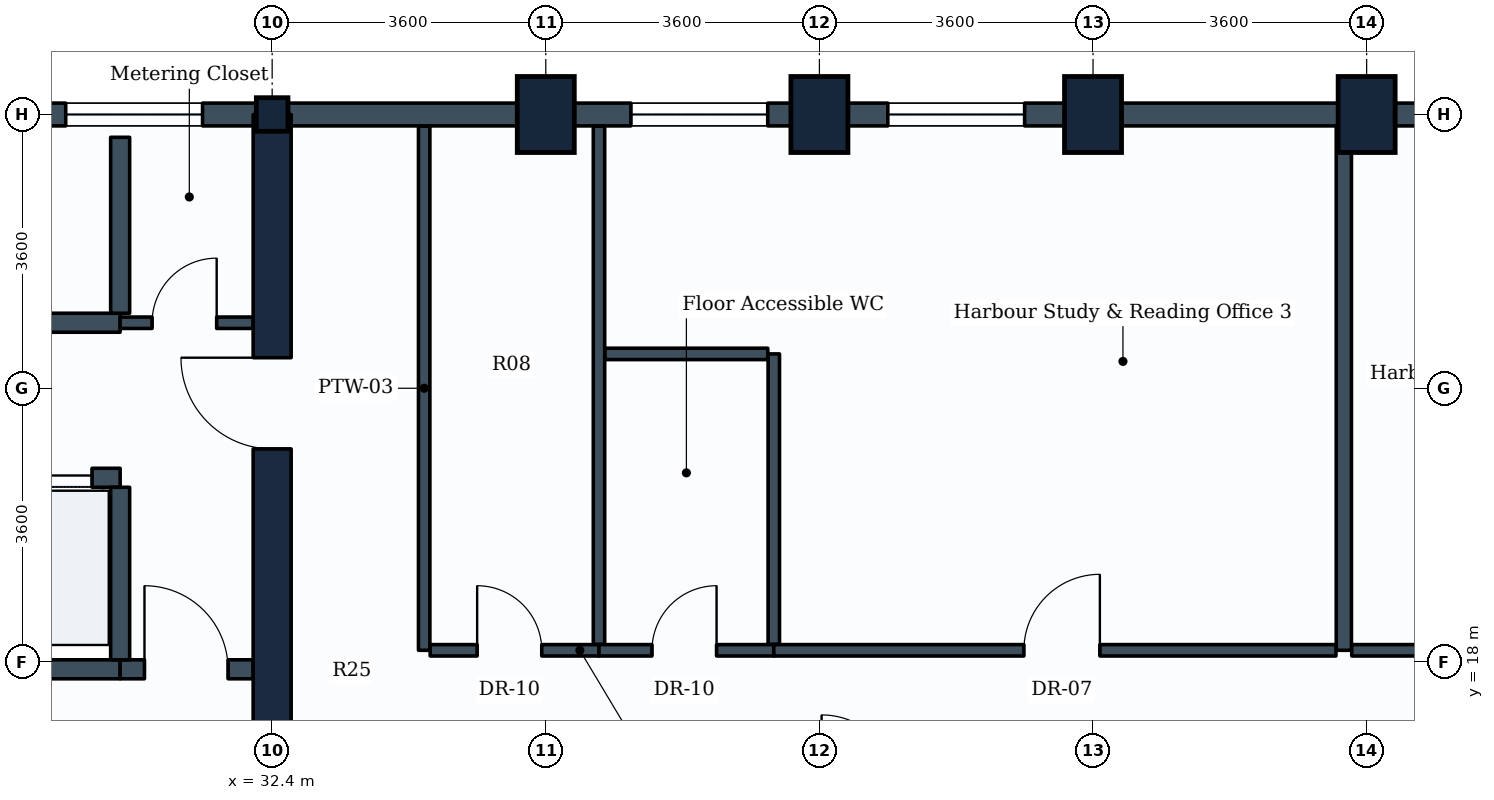
"""IFC4 building model, lengths in metres.
Left out: names, types, materials, properties, quantities, classifications, styles, units other than length and angle.
Written with IfcOpenShell. Run it as: python <this file> out.ifc"""

import sys

from ifc_helpers import new_model, si_unit, direction, frame, frame_2d, origin, origin_2d, place, context, subcontext, project, spatial, rectangle, i_section, extrude, element, fill, save


model = new_model("IFC4")
c1 = context("Model", 3, precision=1e-05, world=origin(), true_north=direction((0.0, 1.0)))
c2 = subcontext(c1, "Body", "Model", "MODEL_VIEW")
j1 = project(units=[si_unit("LENGTHUNIT", "METRE"), si_unit("PLANEANGLEUNIT", "RADIAN")], contexts=[c1])
p1 = place(None, origin())
s1 = spatial("IfcSite", under=j1, at=p1, CompositionType="ELEMENT")
p2 = place(p1, origin())
s2 = spatial("IfcBuilding", under=s1, at=p2, CompositionType="ELEMENT")
p3 = place(p2, frame((0.0, 0.0, 158.0)))
s3 = spatial("IfcBuildingStorey", under=s2, at=p3, CompositionType="ELEMENT", Elevation=158.0)
p4 = place(p3, frame((32.4, 25.2, 0.0), z_axis=(0.0, 0.0, 1.0), x_axis=(1.0, 0.0, 0.0)))
e1 = element("IfcColumn", 1, at=p4, inside=s3, PredefinedType="COLUMN", context=c2, shape_type="SweptSolid", body=[
    extrude(i_section(OverallWidth=0.416, OverallDepth=0.442, WebThickness=0.025, FlangeThickness=0.041, FilletRadius=0.015, at=origin_2d()), origin(), (0.0, 0.0, 1.0), 3.8),
])
for number, where, z_axis, x_axis in (
    (2, (36.0, 25.2, 0.0), (0.0, 0.0, 1.0), (1.0, 0.0, 0.0)),
    (3, (39.6, 25.2, 0.0), (0.0, 0.0, 1.0), (1.0, 0.0, 0.0)),
    (4, (43.2, 25.2, 0.0), (0.0, 0.0, 1.0), (1.0, 0.0, 0.0)),
    (5, (46.8, 25.2, 0.0), (0.0, 0.0, 1.0), (1.0, 0.0, 0.0)),
):
    element("IfcColumn", number, at=place(p3, frame(where, z_axis=z_axis, x_axis=x_axis)), inside=s3, PredefinedType="COLUMN", context=c2, shape_type="SweptSolid", body=[
        extrude(rectangle(XDim=0.75, YDim=1.0, at=origin_2d()), origin(), (0.0, 0.0, 1.0), 3.8),
    ])
p5 = place(p3, frame((46.8, 25.2, 0.0), z_axis=(0.0, 0.0, 1.0), x_axis=(1.0, 0.0, 0.0)))
e6 = element("IfcWall", 6, at=p5, inside=s3, PredefinedType="STANDARD", context=c2, shape_type="SweptSolid", body=[
    extrude(rectangle(XDim=3.6, YDim=0.3, at=frame_2d((1.8, 0.0))), origin(), (0.0, 0.0, 1.0), 2.93),
])
p6 = place(p5, frame((0.875, 0.0, 0.85)))
e7 = element("IfcOpeningElement", 7, at=p6, cuts=e6, PredefinedType="OPENING", context=c2, shape_type="SweptSolid", body=[
    extrude(rectangle(XDim=1.8, YDim=1.35, at=frame_2d((0.9, 0.675))), frame((0.0, 0.16, 0.0), z_axis=(0.0, -1.0, 0.0), x_axis=(1.0, 0.0, 0.0)), (0.0, 0.0, 1.0), 0.32),
])
p7 = place(p3, frame((43.2, 25.2, 0.0), z_axis=(0.0, 0.0, 1.0), x_axis=(1.0, 0.0, 0.0)))
e8 = element("IfcWall", 8, at=p7, inside=s3, PredefinedType="STANDARD", context=c2, shape_type="SweptSolid", body=[
    extrude(rectangle(XDim=3.6, YDim=0.3, at=frame_2d((1.8, 0.0))), origin(), (0.0, 0.0, 1.0), 2.93),
])
p8 = place(p3, frame((39.6, 25.2, 0.0), z_axis=(0.0, 0.0, 1.0), x_axis=(1.0, 0.0, 0.0)))
e9 = element("IfcWall", 9, at=p8, inside=s3, PredefinedType="STANDARD", context=c2, shape_type="SweptSolid", body=[
    extrude(rectangle(XDim=3.6, YDim=0.3, at=frame_2d((1.8, 0.0))), origin(), (0.0, 0.0, 1.0), 2.93),
])
p9 = place(p8, frame((0.9, 0.0, 0.85)))
e10 = element("IfcOpeningElement", 10, at=p9, cuts=e9, PredefinedType="OPENING", context=c2, shape_type="SweptSolid", body=[
    extrude(rectangle(XDim=1.8, YDim=1.35, at=frame_2d((0.9, 0.675))), frame((0.0, 0.16, 0.0), z_axis=(0.0, -1.0, 0.0), x_axis=(1.0, 0.0, 0.0)), (0.0, 0.0, 1.0), 0.32),
])
p10 = place(p3, frame((36.0, 25.2, 0.0), z_axis=(0.0, 0.0, 1.0), x_axis=(1.0, 0.0, 0.0)))
e11 = element("IfcWall", 11, at=p10, inside=s3, PredefinedType="STANDARD", context=c2, shape_type="SweptSolid", body=[
    extrude(rectangle(XDim=3.6, YDim=0.3, at=frame_2d((1.8, 0.0))), origin(), (0.0, 0.0, 1.0), 2.93),
])
p11 = place(p10, frame((1.12, 0.0, 0.85)))
e12 = element("IfcOpeningElement", 12, at=p11, cuts=e11, PredefinedType="OPENING", context=c2, shape_type="SweptSolid", body=[
    extrude(rectangle(XDim=1.8, YDim=1.35, at=frame_2d((0.9, 0.675))), frame((0.0, 0.16, 0.0), z_axis=(0.0, -1.0, 0.0), x_axis=(1.0, 0.0, 0.0)), (0.0, 0.0, 1.0), 0.32),
])
p12 = place(p3, frame((32.4, 25.2, 0.0), z_axis=(0.0, 0.0, 1.0), x_axis=(1.0, 0.0, 0.0)))
e13 = element("IfcWall", 13, at=p12, inside=s3, PredefinedType="STANDARD", context=c2, shape_type="SweptSolid", body=[
    extrude(rectangle(XDim=3.6, YDim=0.3, at=frame_2d((1.8, 0.0))), origin(), (0.0, 0.0, 1.0), 2.93),
])
p13 = place(p3, frame((28.8, 25.2, 0.0), z_axis=(0.0, 0.0, 1.0), x_axis=(1.0, 0.0, 0.0)))
e14 = element("IfcWall", 14, at=p13, inside=s3, PredefinedType="STANDARD", context=c2, shape_type="SweptSolid", body=[
    extrude(rectangle(XDim=3.6, YDim=0.3, at=frame_2d((1.8, 0.0))), origin(), (0.0, 0.0, 1.0), 3.535),
])
p14 = place(p13, frame((0.884, 0.0, 0.85)))
e15 = element("IfcOpeningElement", 15, at=p14, cuts=e14, PredefinedType="OPENING", context=c2, shape_type="SweptSolid", body=[
    extrude(rectangle(XDim=1.8, YDim=1.35, at=frame_2d((0.9, 0.675))), frame((0.0, 0.16, 0.0), z_axis=(0.0, -1.0, 0.0), x_axis=(1.0, 0.0, 0.0)), (0.0, 0.0, 1.0), 0.32),
])
p15 = place(p3, frame((32.4, 10.8, 0.0), z_axis=(0.0, 0.0, 1.0), x_axis=(0.0, 1.0, 0.0)))
e16 = element("IfcWall", 16, at=p15, inside=s3, PredefinedType="SHEAR", context=c2, shape_type="SweptSolid", body=[
    extrude(rectangle(XDim=14.4, YDim=0.5, at=frame_2d((7.2, 0.0))), origin(), (0.0, 0.0, 1.0), 3.55),
])
p16 = place(p15, frame((4.35, 0.0, 0.0)))
e17 = element("IfcOpeningElement", 17, at=p16, cuts=e16, PredefinedType="OPENING", context=c2, shape_type="SweptSolid", body=[
    extrude(rectangle(XDim=1.2, YDim=2.1, at=frame_2d((0.6, 1.05))), frame((0.0, 0.26, 0.0), z_axis=(0.0, -1.0, 0.0), x_axis=(1.0, 0.0, 0.0)), (0.0, 0.0, 1.0), 0.52),
])
p17 = place(p15, frame((10.0, 0.0, 0.0)))
e18 = element("IfcOpeningElement", 18, at=p17, cuts=e16, PredefinedType="OPENING", context=c2, shape_type="SweptSolid", body=[
    extrude(rectangle(XDim=1.2, YDim=2.1, at=frame_2d((0.6, 1.05))), frame((0.0, 0.26, 0.0), z_axis=(0.0, -1.0, 0.0), x_axis=(1.0, 0.0, 0.0)), (0.0, 0.0, 1.0), 0.52),
])
p18 = place(p3, frame((21.88, 17.9, 0.0), z_axis=(0.0, 0.0, 1.0), x_axis=(1.0, 0.0, 0.0)))
e19 = element("IfcWall", 19, at=p18, inside=s3, PredefinedType="PARTITIONING", context=c2, shape_type="SweptSolid", body=[
    extrude(rectangle(XDim=8.52, YDim=0.25, at=frame_2d((4.26, 0.0))), origin(), (0.0, 0.0, 1.0), 3.535),
])
p19 = place(p3, frame((30.4, 17.9, 0.0), z_axis=(0.0, 0.0, 1.0), x_axis=(1.0, 0.0, 0.0)))
e20 = element("IfcWall", 20, at=p19, inside=s3, PredefinedType="PARTITIONING", context=c2, shape_type="SweptSolid", body=[
    extrude(rectangle(XDim=1.75, YDim=0.25, at=frame_2d((0.875, 0.0))), origin(), (0.0, 0.0, 1.0), 3.535),
])
p20 = place(p19, frame((0.32, 0.0, 0.0)))
e21 = element("IfcOpeningElement", 21, at=p20, cuts=e20, PredefinedType="OPENING", context=c2, shape_type="SweptSolid", body=[
    extrude(rectangle(XDim=1.1, YDim=2.1, at=frame_2d((0.55, 1.05))), frame((0.0, 0.135, 0.0), z_axis=(0.0, -1.0, 0.0), x_axis=(1.0, 0.0, 0.0)), (0.0, 0.0, 1.0), 0.27),
])
p21 = place(p3, frame((23.18, 20.42, 0.0), z_axis=(0.0, 0.0, 1.0), x_axis=(1.0, 0.0, 0.0)))
e22 = element("IfcWall", 22, at=p21, inside=s3, PredefinedType="PARTITIONING", context=c2, shape_type="SweptSolid", body=[
    extrude(rectangle(XDim=7.22, YDim=0.25, at=frame_2d((3.61, 0.0))), origin(), (0.0, 0.0, 1.0), 3.535),
])
p22 = place(p21, frame((0.41, 0.0, 0.0)))
e23 = element("IfcOpeningElement", 23, at=p22, cuts=e22, PredefinedType="OPENING", context=c2, shape_type="SweptSolid", body=[
    extrude(rectangle(XDim=1.1, YDim=2.1, at=frame_2d((0.55, 1.05))), frame((0.0, 0.135, 0.0), z_axis=(0.0, -1.0, 0.0), x_axis=(1.0, 0.0, 0.0)), (0.0, 0.0, 1.0), 0.27),
])
p23 = place(p21, frame((2.19, 0.0, 0.0)))
e24 = element("IfcOpeningElement", 24, at=p23, cuts=e22, PredefinedType="OPENING", context=c2, shape_type="SweptSolid", body=[
    extrude(rectangle(XDim=1.1, YDim=2.1, at=frame_2d((0.55, 1.05))), frame((0.0, 0.135, 0.0), z_axis=(0.0, -1.0, 0.0), x_axis=(1.0, 0.0, 0.0)), (0.0, 0.0, 1.0), 0.27),
])
p24 = place(p21, frame((3.97, 0.0, 0.0)))
e25 = element("IfcOpeningElement", 25, at=p24, cuts=e22, PredefinedType="OPENING", context=c2, shape_type="SweptSolid", body=[
    extrude(rectangle(XDim=1.1, YDim=2.1, at=frame_2d((0.55, 1.05))), frame((0.0, 0.135, 0.0), z_axis=(0.0, -1.0, 0.0), x_axis=(1.0, 0.0, 0.0)), (0.0, 0.0, 1.0), 0.27),
])
p25 = place(p21, frame((5.75, 0.0, 0.0)))
e26 = element("IfcOpeningElement", 26, at=p25, cuts=e22, PredefinedType="OPENING", context=c2, shape_type="SweptSolid", body=[
    extrude(rectangle(XDim=1.1, YDim=2.1, at=frame_2d((0.55, 1.05))), frame((0.0, 0.135, 0.0), z_axis=(0.0, -1.0, 0.0), x_axis=(1.0, 0.0, 0.0)), (0.0, 0.0, 1.0), 0.27),
])
p26 = place(p3, frame((30.4, 18.025, 0.0), z_axis=(0.0, 0.0, 1.0), x_axis=(0.0, 1.0, 0.0)))
e27 = element("IfcWall", 27, at=p26, inside=s3, PredefinedType="PARTITIONING", context=c2, shape_type="SweptSolid", body=[
    extrude(rectangle(XDim=2.27, YDim=0.25, at=frame_2d((1.135, 0.0))), origin(), (0.0, 0.0, 1.0), 3.535),
])
p27 = place(p3, frame((23.18, 22.46, 0.0), z_axis=(0.0, 0.0, 1.0), x_axis=(1.0, 0.0, 0.0)))
e28 = element("IfcWall", 28, at=p27, inside=s3, PredefinedType="PARTITIONING", context=c2, shape_type="SweptSolid", body=[
    extrude(rectangle(XDim=7.22, YDim=0.25, at=frame_2d((3.61, 0.0))), origin(), (0.0, 0.0, 1.0), 3.535),
])
p28 = place(p3, frame((30.4, 22.585, 0.0), z_axis=(0.0, 0.0, 1.0), x_axis=(0.0, 1.0, 0.0)))
e29 = element("IfcWall", 29, at=p28, inside=s3, PredefinedType="PARTITIONING", context=c2, shape_type="SweptSolid", body=[
    extrude(rectangle(XDim=2.315, YDim=0.25, at=frame_2d((1.157, 0.0))), origin(), (0.0, 0.0, 1.0), 3.535),
])
p29 = place(p3, frame((30.4, 22.46, 0.0), z_axis=(0.0, 0.0, 1.0), x_axis=(1.0, 0.0, 0.0)))
e30 = element("IfcWall", 30, at=p29, inside=s3, PredefinedType="PARTITIONING", context=c2, shape_type="SweptSolid", body=[
    extrude(rectangle(XDim=1.75, YDim=0.15, at=frame_2d((0.875, 0.0))), origin(), (0.0, 0.0, 1.0), 3.535),
])
p30 = place(p29, frame((0.42, 0.0, 0.0)))
e31 = element("IfcOpeningElement", 31, at=p30, cuts=e30, PredefinedType="OPENING", context=c2, shape_type="SweptSolid", body=[
    extrude(rectangle(XDim=0.85, YDim=2.1, at=frame_2d((0.425, 1.05))), frame((0.0, 0.085, 0.0), z_axis=(0.0, -1.0, 0.0), x_axis=(1.0, 0.0, 0.0)), (0.0, 0.0, 1.0), 0.17),
])
p31 = place(p3, frame((34.4, 18.15, 0.0), z_axis=(0.0, 0.0, 1.0), x_axis=(0.0, 1.0, 0.0)))
e32 = element("IfcWall", 32, at=p31, inside=s3, PredefinedType="PARTITIONING", context=c2, shape_type="SweptSolid", body=[
    extrude(rectangle(XDim=6.896, YDim=0.15, at=frame_2d((3.448, 0.0))), origin(), (0.0, 0.0, 1.0), 2.93),
])
p32 = place(p3, frame((34.479, 18.15, 0.0), z_axis=(0.0, 0.0, 1.0), x_axis=(1.0, 0.0, 0.0)))
e33 = element("IfcWall", 33, at=p32, inside=s3, PredefinedType="PARTITIONING", context=c2, shape_type="SweptSolid", body=[
    extrude(rectangle(XDim=2.221, YDim=0.15, at=frame_2d((1.11, 0.0))), origin(), (0.0, 0.0, 1.0), 3.17),
])
p33 = place(p32, frame((0.618, 0.0, 0.0)))
e34 = element("IfcOpeningElement", 34, at=p33, cuts=e33, PredefinedType="OPENING", context=c2, shape_type="SweptSolid", body=[
    extrude(rectangle(XDim=0.85, YDim=2.1, at=frame_2d((0.425, 1.05))), frame((0.0, 0.085, 0.0), z_axis=(0.0, -1.0, 0.0), x_axis=(1.0, 0.0, 0.0)), (0.0, 0.0, 1.0), 0.17),
])
p34 = place(p3, frame((36.7, 18.229, 0.0), z_axis=(0.0, 0.0, 1.0), x_axis=(0.0, 1.0, 0.0)))
e35 = element("IfcWall", 35, at=p34, inside=s3, PredefinedType="PARTITIONING", context=c2, shape_type="SweptSolid", body=[
    extrude(rectangle(XDim=6.817, YDim=0.15, at=frame_2d((3.408, 0.0))), origin(), (0.0, 0.0, 1.0), 2.93),
])
p35 = place(p3, frame((36.7, 18.15, 0.0), z_axis=(0.0, 0.0, 1.0), x_axis=(1.0, 0.0, 0.0)))
e36 = element("IfcWall", 36, at=p35, inside=s3, PredefinedType="PARTITIONING", context=c2, shape_type="SweptSolid", body=[
    extrude(rectangle(XDim=2.3, YDim=0.15, at=frame_2d((1.15, 0.0))), origin(), (0.0, 0.0, 1.0), 3.17),
])
p36 = place(p35, frame((0.697, 0.0, 0.0)))
e37 = element("IfcOpeningElement", 37, at=p36, cuts=e36, PredefinedType="OPENING", context=c2, shape_type="SweptSolid", body=[
    extrude(rectangle(XDim=0.85, YDim=2.1, at=frame_2d((0.425, 1.05))), frame((0.0, 0.085, 0.0), z_axis=(0.0, -1.0, 0.0), x_axis=(1.0, 0.0, 0.0)), (0.0, 0.0, 1.0), 0.17),
])
p37 = place(p3, frame((39.0, 18.229, 0.0), z_axis=(0.0, 0.0, 1.0), x_axis=(0.0, 1.0, 0.0)))
e38 = element("IfcWall", 38, at=p37, inside=s3, PredefinedType="PARTITIONING", context=c2, shape_type="SweptSolid", body=[
    extrude(rectangle(XDim=3.821, YDim=0.15, at=frame_2d((1.911, 0.0))), origin(), (0.0, 0.0, 1.0), 3.17),
])
p38 = place(p3, frame((36.779, 22.05, 0.0), z_axis=(0.0, 0.0, 1.0), x_axis=(1.0, 0.0, 0.0)))
e39 = element("IfcWall", 39, at=p38, inside=s3, PredefinedType="PARTITIONING", context=c2, shape_type="SweptSolid", body=[
    extrude(rectangle(XDim=2.142, YDim=0.15, at=frame_2d((1.071, 0.0))), origin(), (0.0, 0.0, 1.0), 3.535),
])
p39 = place(p3, frame((46.5, 18.15, 0.0), z_axis=(0.0, 0.0, 1.0), x_axis=(0.0, 1.0, 0.0)))
e40 = element("IfcWall", 40, at=p39, inside=s3, PredefinedType="PARTITIONING", context=c2, shape_type="SweptSolid", body=[
    extrude(rectangle(XDim=6.896, YDim=0.2, at=frame_2d((3.448, 0.0))), origin(), (0.0, 0.0, 1.0), 2.93),
])
p40 = place(p3, frame((39.0, 18.15, 0.0), z_axis=(0.0, 0.0, 1.0), x_axis=(1.0, 0.0, 0.0)))
e41 = element("IfcWall", 41, at=p40, inside=s3, PredefinedType="PARTITIONING", context=c2, shape_type="SweptSolid", body=[
    extrude(rectangle(XDim=7.396, YDim=0.15, at=frame_2d((3.698, 0.0))), origin(), (0.0, 0.0, 1.0), 3.17),
])
p41 = place(p40, frame((3.29, 0.0, 0.0)))
e42 = element("IfcOpeningElement", 42, at=p41, cuts=e41, PredefinedType="OPENING", context=c2, shape_type="SweptSolid", body=[
    extrude(rectangle(XDim=1.0, YDim=2.1, at=frame_2d((0.5, 1.05))), frame((0.0, 0.085, 0.0), z_axis=(0.0, -1.0, 0.0), x_axis=(1.0, 0.0, 0.0)), (0.0, 0.0, 1.0), 0.17),
])
p42 = place(p3, frame((46.604, 18.15, 0.0), z_axis=(0.0, 0.0, 1.0), x_axis=(1.0, 0.0, 0.0)))
e43 = element("IfcWall", 43, at=p42, inside=s3, PredefinedType="PARTITIONING", context=c2, shape_type="SweptSolid", body=[
    extrude(rectangle(XDim=7.242, YDim=0.15, at=frame_2d((3.621, 0.0))), origin(), (0.0, 0.0, 1.0), 2.93),
])
p43 = place(p42, frame((3.186, 0.0, 0.0)))
e44 = element("IfcOpeningElement", 44, at=p43, cuts=e43, PredefinedType="OPENING", context=c2, shape_type="SweptSolid", body=[
    extrude(rectangle(XDim=1.0, YDim=2.1, at=frame_2d((0.5, 1.05))), frame((0.0, 0.085, 0.0), z_axis=(0.0, -1.0, 0.0), x_axis=(1.0, 0.0, 0.0)), (0.0, 0.0, 1.0), 0.17),
])
p44 = place(p9, origin())
e45 = element("IfcWindow", 45, at=p44, inside=s3, PartitioningType="SINGLE_PANEL", PredefinedType="WINDOW", context=c2, shape_type="SweptSolid", body=[
    extrude(rectangle(XDim=1.8, YDim=1.35, at=frame_2d((0.9, 0.675))), frame((0.0, 0.03, 0.0), z_axis=(0.0, -1.0, 0.0), x_axis=(1.0, 0.0, 0.0)), (0.0, 0.0, 1.0), 0.06),
])
fill(e10, e45)
p45 = place(p11, origin())
e46 = element("IfcWindow", 46, at=p45, inside=s3, PartitioningType="SINGLE_PANEL", PredefinedType="WINDOW", context=c2, shape_type="SweptSolid", body=[
    extrude(rectangle(XDim=1.8, YDim=1.35, at=frame_2d((0.9, 0.675))), frame((0.0, 0.03, 0.0), z_axis=(0.0, -1.0, 0.0), x_axis=(1.0, 0.0, 0.0)), (0.0, 0.0, 1.0), 0.06),
])
fill(e12, e46)
p46 = place(p14, origin())
e47 = element("IfcWindow", 47, at=p46, inside=s3, PartitioningType="SINGLE_PANEL", PredefinedType="WINDOW", context=c2, shape_type="SweptSolid", body=[
    extrude(rectangle(XDim=1.8, YDim=1.35, at=frame_2d((0.9, 0.675))), frame((0.0, 0.03, 0.0), z_axis=(0.0, -1.0, 0.0), x_axis=(1.0, 0.0, 0.0)), (0.0, 0.0, 1.0), 0.06),
])
fill(e15, e47)
p47 = place(p20, origin())
e48 = element("IfcDoor", 48, at=p47, inside=s3, OperationType="SINGLE_SWING_LEFT", PredefinedType="DOOR", context=c2, shape_type="SweptSolid", body=[
    extrude(rectangle(XDim=1.1, YDim=2.1, at=frame_2d((0.55, 1.05))), frame((0.0, 0.025, 0.0), z_axis=(0.0, -1.0, 0.0), x_axis=(1.0, 0.0, 0.0)), (0.0, 0.0, 1.0), 0.05),
])
fill(e21, e48)
p48 = place(p25, origin())
e49 = element("IfcDoor", 49, at=p48, inside=s3, OperationType="SLIDING_TO_LEFT", PredefinedType="DOOR", context=c2, shape_type="SweptSolid", body=[
    extrude(rectangle(XDim=1.1, YDim=2.1, at=frame_2d((0.55, 1.05))), frame((0.0, 0.025, 0.0), z_axis=(0.0, -1.0, 0.0), x_axis=(1.0, 0.0, 0.0)), (0.0, 0.0, 1.0), 0.05),
])
fill(e26, e49)
p49 = place(p17, origin())
e50 = element("IfcDoor", 50, at=p49, inside=s3, OperationType="SINGLE_SWING_RIGHT", PredefinedType="DOOR", context=c2, shape_type="SweptSolid", body=[
    extrude(rectangle(XDim=1.2, YDim=2.1, at=frame_2d((0.6, 1.05))), frame((0.0, 0.025, 0.0), z_axis=(0.0, -1.0, 0.0), x_axis=(1.0, 0.0, 0.0)), (0.0, 0.0, 1.0), 0.05),
])
fill(e18, e50)
p50 = place(p30, origin())
e51 = element("IfcDoor", 51, at=p50, inside=s3, OperationType="SINGLE_SWING_RIGHT", PredefinedType="DOOR", context=c2, shape_type="SweptSolid", body=[
    extrude(rectangle(XDim=0.85, YDim=2.1, at=frame_2d((0.425, 1.05))), frame((0.0, 0.025, 0.0), z_axis=(0.0, -1.0, 0.0), x_axis=(1.0, 0.0, 0.0)), (0.0, 0.0, 1.0), 0.05),
])
fill(e31, e51)
p51 = place(p33, origin())
e52 = element("IfcDoor", 52, at=p51, inside=s3, OperationType="SINGLE_SWING_LEFT", PredefinedType="DOOR", context=c2, shape_type="SweptSolid", body=[
    extrude(rectangle(XDim=0.85, YDim=2.1, at=frame_2d((0.425, 1.05))), frame((0.0, 0.025, 0.0), z_axis=(0.0, -1.0, 0.0), x_axis=(1.0, 0.0, 0.0)), (0.0, 0.0, 1.0), 0.05),
])
fill(e34, e52)
p52 = place(p36, origin())
e53 = element("IfcDoor", 53, at=p52, inside=s3, OperationType="SINGLE_SWING_RIGHT", PredefinedType="DOOR", context=c2, shape_type="SweptSolid", body=[
    extrude(rectangle(XDim=0.85, YDim=2.1, at=frame_2d((0.425, 1.05))), frame((0.0, 0.025, 0.0), z_axis=(0.0, -1.0, 0.0), x_axis=(1.0, 0.0, 0.0)), (0.0, 0.0, 1.0), 0.05),
])
fill(e37, e53)
p53 = place(p41, origin())
e54 = element("IfcDoor", 54, at=p53, inside=s3, OperationType="SINGLE_SWING_RIGHT", PredefinedType="DOOR", context=c2, shape_type="SweptSolid", body=[
    extrude(rectangle(XDim=1.0, YDim=2.1, at=frame_2d((0.5, 1.05))), frame((0.0, 0.025, 0.0), z_axis=(0.0, -1.0, 0.0), x_axis=(1.0, 0.0, 0.0)), (0.0, 0.0, 1.0), 0.05),
])
fill(e42, e54)
save(model, sys.argv[1])
